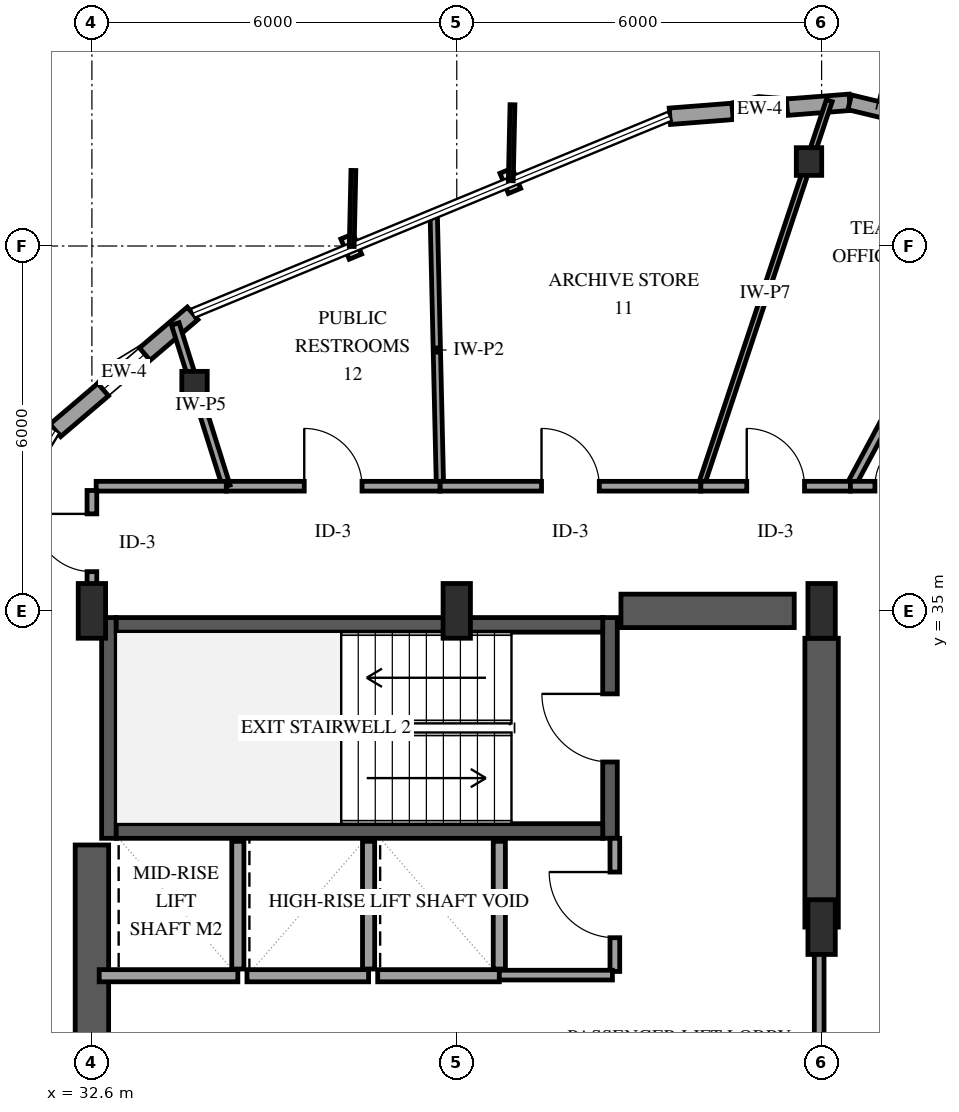
"""IFC4 building model, lengths in metres.
Left out: names, types, materials, properties, quantities, classifications, styles, units other than length and angle.
Written with IfcOpenShell. Run it as: python <this file> out.ifc"""

import sys

from ifc_helpers import new_model, si_unit, direction, frame, frame_2d, origin, origin_2d, place, context, subcontext, project, spatial, rectangle, i_section, extrude, element, fill, save


model = new_model("IFC4")
c1 = context("Model", 3, precision=1e-05, world=origin(), true_north=direction((0.0, 1.0)))
c2 = subcontext(c1, "Body", "Model", "MODEL_VIEW")
j1 = project(units=[si_unit("LENGTHUNIT", "METRE"), si_unit("PLANEANGLEUNIT", "RADIAN")], contexts=[c1])
p1 = place(None, origin())
s1 = spatial("IfcSite", under=j1, at=p1, CompositionType="ELEMENT")
p2 = place(p1, origin())
s2 = spatial("IfcBuilding", under=s1, at=p2, CompositionType="ELEMENT")
p3 = place(p2, frame((0.0, 0.0, 114.7)))
s3 = spatial("IfcBuildingStorey", under=s2, at=p3, CompositionType="ELEMENT", Elevation=114.7)
p4 = place(p3, frame((32.88, 31.26, 0.0), z_axis=(0.0, 0.0, 1.0), x_axis=(0.0, 1.0, 0.0)))
e1 = element("IfcWall", 1, at=p4, inside=s3, PredefinedType="SHEAR", context=c2, shape_type="SweptSolid", body=[
    extrude(rectangle(XDim=3.63, YDim=0.24, at=frame_2d((1.815, 0.0))), origin(), (0.0, 0.0, 1.0), 3.9),
])
p5 = place(p3, frame((41.12, 31.26, 0.0), z_axis=(0.0, 0.0, 1.0), x_axis=(0.0, 1.0, 0.0)))
e2 = element("IfcWall", 2, at=p5, inside=s3, PredefinedType="SHEAR", context=c2, shape_type="SweptSolid", body=[
    extrude(rectangle(XDim=3.63, YDim=0.24, at=frame_2d((1.815, 0.0))), origin(), (0.0, 0.0, 1.0), 3.9),
])
p6 = place(p5, frame((1.255, 0.0, 0.0)))
e3 = element("IfcOpeningElement", 3, at=p6, cuts=e2, PredefinedType="OPENING", context=c2, shape_type="SweptSolid", body=[
    extrude(rectangle(XDim=1.12, YDim=2.15, at=frame_2d((0.56, 1.075))), frame((0.0, 0.13, 0.0), z_axis=(0.0, -1.0, 0.0), x_axis=(1.0, 0.0, 0.0)), (0.0, 0.0, 1.0), 0.26),
])
for number, where, z_axis, x_axis in (
    (4, (33.0, 31.38, 0.0), (0.0, 0.0, 1.0), (1.0, 0.0, 0.0)),
    (5, (33.0, 34.77, 0.0), (0.0, 0.0, 1.0), (1.0, 0.0, 0.0)),
):
    element("IfcWall", number, at=place(p3, frame(where, z_axis=z_axis, x_axis=x_axis)), inside=s3, PredefinedType="SHEAR", context=c2, shape_type="SweptSolid", body=[
        extrude(rectangle(XDim=8.0, YDim=0.24, at=frame_2d((4.0, 0.0))), origin(), (0.0, 0.0, 1.0), 3.9),
    ])
p7 = place(p3, frame((32.6, 18.85, 0.0), z_axis=(0.0, 0.0, 1.0), x_axis=(0.0, 1.0, 0.0)))
e6 = element("IfcWall", 6, at=p7, inside=s3, PredefinedType="SHEAR", context=c2, shape_type="SweptSolid", body=[
    extrude(rectangle(XDim=12.3, YDim=0.55, at=frame_2d((6.15, 0.0))), origin(), (0.0, 0.0, 1.0), 3.9),
])
p8 = place(p3, frame((41.3, 35.0, 0.0), z_axis=(0.0, 0.0, 1.0), x_axis=(1.0, 0.0, 0.0)))
e7 = element("IfcWall", 7, at=p8, inside=s3, PredefinedType="SHEAR", context=c2, shape_type="SweptSolid", body=[
    extrude(rectangle(XDim=2.85, YDim=0.55, at=frame_2d((1.425, 0.0))), origin(), (0.0, 0.0, 1.0), 3.9),
])
p9 = place(p3, frame((44.6, 29.8, 0.0), z_axis=(0.0, 0.0, 1.0), x_axis=(0.0, 1.0, 0.0)))
e8 = element("IfcWall", 8, at=p9, inside=s3, PredefinedType="SHEAR", context=c2, shape_type="SweptSolid", body=[
    extrude(rectangle(XDim=4.75, YDim=0.55, at=frame_2d((2.375, 0.0))), origin(), (0.0, 0.0, 1.0), 3.9),
])
for number, where, z_axis, x_axis in (
    (9, (32.6, 35.0, 0.0), (0.0, 0.0, 1.0), (1.0, 0.0, 0.0)),
    (10, (38.6, 35.0, 0.0), (0.0, 0.0, 1.0), (1.0, 0.0, 0.0)),
    (11, (44.6, 29.8, 0.0), (0.0, 0.0, 1.0), (1.0, 0.0, 0.0)),
    (12, (44.6, 35.0, 0.0), (0.0, 0.0, 1.0), (1.0, 0.0, 0.0)),
):
    element("IfcColumn", number, at=place(p3, frame(where, z_axis=z_axis, x_axis=x_axis)), inside=s3, PredefinedType="PILASTER", context=c2, shape_type="SweptSolid", body=[
        extrude(rectangle(XDim=0.45, YDim=0.9, at=origin_2d()), origin(), (0.0, 0.0, 1.0), 3.9),
    ])
for number, where, z_axis, x_axis in (
    (13, (44.393, 42.389, 0.0), (0.0, 0.0, 1.0), (1.0, 0.0, 0.0)),
    (14, (34.288, 38.711, 0.0), (0.0, 0.0, 1.0), (1.0, 0.0, 0.0)),
):
    element("IfcColumn", number, at=place(p3, frame(where, z_axis=z_axis, x_axis=x_axis)), inside=s3, PredefinedType="COLUMN", context=c2, shape_type="SweptSolid", body=[
        extrude(i_section(OverallWidth=0.418, OverallDepth=0.455, WebThickness=0.042, FlangeThickness=0.068, FilletRadius=0.038, at=origin_2d()), origin(), (0.0, 0.0, 1.0), 3.9),
    ])
p10 = place(p3, frame((45.062, 43.364, 0.0), z_axis=(0.0, 0.0, 1.0), x_axis=(-0.99699708695, -0.077439063873, 0.0)))
e15 = element("IfcWall", 15, at=p10, inside=s3, PredefinedType="SOLIDWALL", context=c2, shape_type="SweptSolid", body=[
    extrude(rectangle(XDim=2.967, YDim=0.27, at=frame_2d((1.483, 0.0))), origin(), (0.0, 0.0, 1.0), 2.979),
])
p11 = place(p10, frame((1.033, 0.0, 0.75)))
e16 = element("IfcOpeningElement", 16, at=p11, cuts=e15, PredefinedType="OPENING", context=c2, shape_type="SweptSolid", body=[
    extrude(rectangle(XDim=0.9, YDim=1.5, at=frame_2d((0.45, 0.75))), frame((0.0, 0.145, 0.0), z_axis=(0.0, -1.0, 0.0), x_axis=(1.0, 0.0, 0.0)), (0.0, 0.0, 1.0), 0.29),
])
p12 = place(p3, frame((53.316, 41.373, 0.0), z_axis=(0.0, 0.0, 1.0), x_axis=(-0.972125162173, 0.234462511014, 0.0)))
e17 = element("IfcWall", 17, at=p12, inside=s3, PredefinedType="SOLIDWALL", context=c2, shape_type="SweptSolid", body=[
    extrude(rectangle(XDim=8.49, YDim=0.25, at=frame_2d((4.245, 0.0))), origin(), (0.0, 0.0, 1.0), 2.979),
])
p13 = place(p12, frame((3.745, 0.0, 0.0)))
e18 = element("IfcOpeningElement", 18, at=p13, cuts=e17, PredefinedType="OPENING", context=c2, shape_type="SweptSolid", body=[
    extrude(rectangle(XDim=1.05, YDim=2.15, at=frame_2d((0.525, 1.075))), frame((0.0, 0.135, 0.0), z_axis=(0.0, -1.0, 0.0), x_axis=(1.0, 0.0, 0.0)), (0.0, 0.0, 1.0), 0.27),
])
p14 = place(p12, frame((0.44, 0.0, 0.72)))
e19 = element("IfcOpeningElement", 19, at=p14, cuts=e17, PredefinedType="OPENING", context=c2, shape_type="SweptSolid", body=[
    extrude(rectangle(XDim=0.9, YDim=1.5, at=frame_2d((0.45, 0.75))), frame((0.0, 0.135, 0.0), z_axis=(0.0, -1.0, 0.0), x_axis=(1.0, 0.0, 0.0)), (0.0, 0.0, 1.0), 0.27),
])
p15 = place(p12, frame((5.907, 0.0, 0.72)))
e20 = element("IfcOpeningElement", 20, at=p15, cuts=e17, PredefinedType="OPENING", context=c2, shape_type="SweptSolid", body=[
    extrude(rectangle(XDim=1.2, YDim=1.6, at=frame_2d((0.6, 0.8))), frame((0.0, 0.135, 0.0), z_axis=(0.0, -1.0, 0.0), x_axis=(1.0, 0.0, 0.0)), (0.0, 0.0, 1.0), 0.27),
])
p16 = place(p3, frame((34.256, 39.893, 0.0), z_axis=(0.0, 0.0, 1.0), x_axis=(-0.761118325799, -0.648613054241, 0.0)))
e21 = element("IfcWall", 21, at=p16, inside=s3, PredefinedType="SOLIDWALL", context=c2, shape_type="SweptSolid", body=[
    extrude(rectangle(XDim=2.967, YDim=0.27, at=frame_2d((1.483, 0.0))), origin(), (0.0, 0.0, 1.0), 2.979),
])
p17 = place(p16, frame((1.033, 0.0, 0.75)))
e22 = element("IfcOpeningElement", 22, at=p17, cuts=e21, PredefinedType="OPENING", context=c2, shape_type="SweptSolid", body=[
    extrude(rectangle(XDim=0.9, YDim=1.5, at=frame_2d((0.45, 0.75))), frame((0.0, 0.145, 0.0), z_axis=(0.0, -1.0, 0.0), x_axis=(1.0, 0.0, 0.0)), (0.0, 0.0, 1.0), 0.29),
])
p18 = place(p3, frame((32.72, 29.0, 0.0), z_axis=(0.0, 0.0, 1.0), x_axis=(1.0, 0.0, 0.0)))
e23 = element("IfcWall", 23, at=p18, inside=s3, PredefinedType="SOLIDWALL", context=c2, shape_type="SweptSolid", body=[
    extrude(rectangle(XDim=2.28, YDim=0.2, at=frame_2d((1.14, 0.0))), origin(), (0.0, 0.0, 1.0), 3.6),
])
p19 = place(p3, frame((35.0, 29.11, 0.0), z_axis=(0.0, 0.0, 1.0), x_axis=(0.0, 1.0, 0.0)))
e24 = element("IfcWall", 24, at=p19, inside=s3, PredefinedType="SOLIDWALL", context=c2, shape_type="SweptSolid", body=[
    extrude(rectangle(XDim=2.1, YDim=0.2, at=frame_2d((1.05, 0.0))), origin(), (0.0, 0.0, 1.0), 3.6),
])
p20 = place(p3, frame((35.15, 29.0, 0.0), z_axis=(0.0, 0.0, 1.0), x_axis=(1.0, 0.0, 0.0)))
e25 = element("IfcWall", 25, at=p20, inside=s3, PredefinedType="SOLIDWALL", context=c2, shape_type="SweptSolid", body=[
    extrude(rectangle(XDim=2.0, YDim=0.2, at=frame_2d((1.0, 0.0))), origin(), (0.0, 0.0, 1.0), 3.6),
])
p21 = place(p3, frame((37.15, 29.11, 0.0), z_axis=(0.0, 0.0, 1.0), x_axis=(0.0, 1.0, 0.0)))
e26 = element("IfcWall", 26, at=p21, inside=s3, PredefinedType="SOLIDWALL", context=c2, shape_type="SweptSolid", body=[
    extrude(rectangle(XDim=2.1, YDim=0.2, at=frame_2d((1.05, 0.0))), origin(), (0.0, 0.0, 1.0), 3.6),
])
p22 = place(p3, frame((37.3, 29.0, 0.0), z_axis=(0.0, 0.0, 1.0), x_axis=(1.0, 0.0, 0.0)))
e27 = element("IfcWall", 27, at=p22, inside=s3, PredefinedType="SOLIDWALL", context=c2, shape_type="SweptSolid", body=[
    extrude(rectangle(XDim=2.0, YDim=0.2, at=frame_2d((1.0, 0.0))), origin(), (0.0, 0.0, 1.0), 3.6),
])
p23 = place(p3, frame((39.3, 29.11, 0.0), z_axis=(0.0, 0.0, 1.0), x_axis=(0.0, 1.0, 0.0)))
e28 = element("IfcWall", 28, at=p23, inside=s3, PredefinedType="SOLIDWALL", context=c2, shape_type="SweptSolid", body=[
    extrude(rectangle(XDim=2.1, YDim=0.2, at=frame_2d((1.05, 0.0))), origin(), (0.0, 0.0, 1.0), 3.6),
])
p24 = place(p3, frame((44.56, 29.8, 0.0), z_axis=(0.0, 0.0, 1.0), x_axis=(0.0, -1.0, 0.0)))
e29 = element("IfcWall", 29, at=p24, inside=s3, PredefinedType="PARTITIONING", context=c2, shape_type="SweptSolid", body=[
    extrude(rectangle(XDim=6.91, YDim=0.16, at=frame_2d((3.455, 0.0))), origin(), (0.0, 0.0, 1.0), 2.64),
])
p25 = place(p24, frame((2.915, 0.0, 0.0)))
e30 = element("IfcOpeningElement", 30, at=p25, cuts=e29, PredefinedType="OPENING", context=c2, shape_type="SweptSolid", body=[
    extrude(rectangle(XDim=1.08, YDim=2.15, at=frame_2d((0.54, 1.075))), frame((0.0, 0.09, 0.0), z_axis=(0.0, -1.0, 0.0), x_axis=(1.0, 0.0, 0.0)), (0.0, 0.0, 1.0), 0.18),
])
p26 = place(p3, frame((42.614, 37.05, 0.0), z_axis=(0.0, 0.0, 1.0), x_axis=(0.316063354252, 0.948738086143, 0.0)))
e31 = element("IfcWall", 31, at=p26, inside=s3, PredefinedType="PARTITIONING", context=c2, shape_type="SweptSolid", body=[
    extrude(rectangle(XDim=6.682, YDim=0.1, at=frame_2d((3.341, 0.0))), origin(), (0.0, 0.0, 1.0), 2.895),
])
p27 = place(p3, frame((45.074, 37.05, 0.0), z_axis=(0.0, 0.0, 1.0), x_axis=(0.473319167136, 0.880891006891, 0.0)))
e32 = element("IfcWall", 32, at=p27, inside=s3, PredefinedType="PARTITIONING", context=c2, shape_type="SweptSolid", body=[
    extrude(rectangle(XDim=6.342, YDim=0.14, at=frame_2d((3.171, 0.0))), origin(), (0.0, 0.0, 1.0), 2.974),
])
p28 = place(p3, frame((38.324, 37.05, 0.0), z_axis=(0.0, 0.0, 1.0), x_axis=(-0.022991196277, 0.999735667511, 0.0)))
e33 = element("IfcWall", 33, at=p28, inside=s3, PredefinedType="PARTITIONING", context=c2, shape_type="SweptSolid", body=[
    extrude(rectangle(XDim=4.481, YDim=0.12, at=frame_2d((2.241, 0.0))), origin(), (0.0, 0.0, 1.0), 3.6),
])
p29 = place(p3, frame((38.324, 37.05, 0.0), z_axis=(0.0, 0.0, 1.0), x_axis=(1.0, 0.0, 0.0)))
e34 = element("IfcWall", 34, at=p29, inside=s3, PredefinedType="PARTITIONING", context=c2, shape_type="SweptSolid", body=[
    extrude(rectangle(XDim=4.29, YDim=0.16, at=frame_2d((2.145, 0.0))), origin(), (0.0, 0.0, 1.0), 3.6),
])
p30 = place(p29, frame((1.67, 0.0, 0.0)))
e35 = element("IfcOpeningElement", 35, at=p30, cuts=e34, PredefinedType="OPENING", context=c2, shape_type="SweptSolid", body=[
    extrude(rectangle(XDim=0.95, YDim=2.15, at=frame_2d((0.475, 1.075))), frame((0.0, 0.09, 0.0), z_axis=(0.0, -1.0, 0.0), x_axis=(1.0, 0.0, 0.0)), (0.0, 0.0, 1.0), 0.18),
])
p31 = place(p3, frame((34.81, 37.05, 0.0), z_axis=(0.0, 0.0, 1.0), x_axis=(1.0, 0.0, 0.0)))
e36 = element("IfcWall", 36, at=p31, inside=s3, PredefinedType="PARTITIONING", context=c2, shape_type="SweptSolid", body=[
    extrude(rectangle(XDim=3.514, YDim=0.16, at=frame_2d((1.757, 0.0))), origin(), (0.0, 0.0, 1.0), 3.6),
])
p32 = place(p31, frame((1.282, 0.0, 0.0)))
e37 = element("IfcOpeningElement", 37, at=p32, cuts=e36, PredefinedType="OPENING", context=c2, shape_type="SweptSolid", body=[
    extrude(rectangle(XDim=0.95, YDim=2.15, at=frame_2d((0.475, 1.075))), frame((0.0, 0.09, 0.0), z_axis=(0.0, -1.0, 0.0), x_axis=(1.0, 0.0, 0.0)), (0.0, 0.0, 1.0), 0.18),
])
p33 = place(p3, frame((34.81, 37.05, 0.0), z_axis=(0.0, 0.0, 1.0), x_axis=(-0.300024068353, 0.953931631936, 0.0)))
e38 = element("IfcWall", 38, at=p33, inside=s3, PredefinedType="PARTITIONING", context=c2, shape_type="SweptSolid", body=[
    extrude(rectangle(XDim=2.797, YDim=0.13, at=frame_2d((1.398, 0.0))), origin(), (0.0, 0.0, 1.0), 2.895),
])
p34 = place(p3, frame((42.614, 37.05, 0.0), z_axis=(0.0, 0.0, 1.0), x_axis=(1.0, 0.0, 0.0)))
e39 = element("IfcWall", 39, at=p34, inside=s3, PredefinedType="PARTITIONING", context=c2, shape_type="SweptSolid", body=[
    extrude(rectangle(XDim=2.46, YDim=0.16, at=frame_2d((1.23, 0.0))), origin(), (0.0, 0.0, 1.0), 3.6),
])
p35 = place(p34, frame((0.755, 0.0, 0.0)))
e40 = element("IfcOpeningElement", 40, at=p35, cuts=e39, PredefinedType="OPENING", context=c2, shape_type="SweptSolid", body=[
    extrude(rectangle(XDim=0.95, YDim=2.15, at=frame_2d((0.475, 1.075))), frame((0.0, 0.09, 0.0), z_axis=(0.0, -1.0, 0.0), x_axis=(1.0, 0.0, 0.0)), (0.0, 0.0, 1.0), 0.18),
])
p36 = place(p3, frame((41.2, 29.07, 0.0), z_axis=(0.0, 0.0, 1.0), x_axis=(0.0, 1.0, 0.0)))
e41 = element("IfcWall", 41, at=p36, inside=s3, PredefinedType="PARTITIONING", context=c2, shape_type="SweptSolid", body=[
    extrude(rectangle(XDim=2.19, YDim=0.16, at=frame_2d((1.095, 0.0))), origin(), (0.0, 0.0, 1.0), 3.6),
])
p37 = place(p36, frame((0.555, 0.0, 0.0)))
e42 = element("IfcOpeningElement", 42, at=p37, cuts=e41, PredefinedType="OPENING", context=c2, shape_type="SweptSolid", body=[
    extrude(rectangle(XDim=1.08, YDim=2.15, at=frame_2d((0.54, 1.075))), frame((0.0, 0.09, 0.0), z_axis=(0.0, -1.0, 0.0), x_axis=(1.0, 0.0, 0.0)), (0.0, 0.0, 1.0), 0.18),
])
p38 = place(p3, frame((32.67, 37.05, 0.0), z_axis=(0.0, 0.0, 1.0), x_axis=(1.0, 0.0, 0.0)))
e43 = element("IfcWall", 43, at=p38, inside=s3, PredefinedType="PARTITIONING", context=c2, shape_type="SweptSolid", body=[
    extrude(rectangle(XDim=2.14, YDim=0.16, at=frame_2d((1.07, 0.0))), origin(), (0.0, 0.0, 1.0), 3.6),
])
p39 = place(p3, frame((32.6, 35.07, 0.0), z_axis=(0.0, 0.0, 1.0), x_axis=(0.0, 1.0, 0.0)))
e44 = element("IfcWall", 44, at=p39, inside=s3, PredefinedType="PARTITIONING", context=c2, shape_type="SweptSolid", body=[
    extrude(rectangle(XDim=1.91, YDim=0.16, at=frame_2d((0.955, 0.0))), origin(), (0.0, 0.0, 1.0), 3.6),
])
p40 = place(p39, frame((0.575, 0.0, 0.0)))
e45 = element("IfcOpeningElement", 45, at=p40, cuts=e44, PredefinedType="OPENING", context=c2, shape_type="SweptSolid", body=[
    extrude(rectangle(XDim=0.95, YDim=2.15, at=frame_2d((0.475, 1.075))), frame((0.0, 0.09, 0.0), z_axis=(0.0, -1.0, 0.0), x_axis=(1.0, 0.0, 0.0)), (0.0, 0.0, 1.0), 0.18),
])
p41 = place(p3, frame((39.3, 29.01, 0.0), z_axis=(0.0, 0.0, 1.0), x_axis=(1.0, 0.0, 0.0)))
e46 = element("IfcWall", 46, at=p41, inside=s3, PredefinedType="PARTITIONING", context=c2, shape_type="SweptSolid", body=[
    extrude(rectangle(XDim=1.86, YDim=0.16, at=frame_2d((0.93, 0.0))), origin(), (0.0, 0.0, 1.0), 3.6),
])
p42 = place(p3, frame((45.074, 37.05, 0.0), z_axis=(0.0, 0.0, 1.0), x_axis=(1.0, 0.0, 0.0)))
e47 = element("IfcWall", 47, at=p42, inside=s3, PredefinedType="PARTITIONING", context=c2, shape_type="SweptSolid", body=[
    extrude(rectangle(XDim=1.506, YDim=0.16, at=frame_2d((0.753, 0.0))), origin(), (0.0, 0.0, 1.0), 3.6),
])
p43 = place(p42, frame((0.403, 0.0, 0.0)))
e48 = element("IfcOpeningElement", 48, at=p43, cuts=e47, PredefinedType="OPENING", context=c2, shape_type="SweptSolid", body=[
    extrude(rectangle(XDim=0.85, YDim=2.1, at=frame_2d((0.425, 1.05))), frame((0.0, 0.09, 0.0), z_axis=(0.0, -1.0, 0.0), x_axis=(1.0, 0.0, 0.0)), (0.0, 0.0, 1.0), 0.18),
])
p44 = place(p11, origin())
e49 = element("IfcWindow", 49, at=p44, inside=s3, PartitioningType="SINGLE_PANEL", PredefinedType="WINDOW", context=c2, shape_type="SweptSolid", body=[
    extrude(rectangle(XDim=0.9, YDim=1.5, at=frame_2d((0.45, 0.75))), frame((0.0, 0.03, 0.0), z_axis=(0.0, -1.0, 0.0), x_axis=(1.0, 0.0, 0.0)), (0.0, 0.0, 1.0), 0.06),
])
fill(e16, e49)
p45 = place(p17, origin())
e50 = element("IfcWindow", 50, at=p45, inside=s3, PartitioningType="SINGLE_PANEL", PredefinedType="WINDOW", context=c2, shape_type="SweptSolid", body=[
    extrude(rectangle(XDim=0.9, YDim=1.5, at=frame_2d((0.45, 0.75))), frame((0.0, 0.03, 0.0), z_axis=(0.0, -1.0, 0.0), x_axis=(1.0, 0.0, 0.0)), (0.0, 0.0, 1.0), 0.06),
])
fill(e22, e50)
p46 = place(p6, origin())
e51 = element("IfcDoor", 51, at=p46, inside=s3, OperationType="SINGLE_SWING_RIGHT", PredefinedType="DOOR", context=c2, shape_type="SweptSolid", body=[
    extrude(rectangle(XDim=1.12, YDim=2.15, at=frame_2d((0.56, 1.075))), frame((0.0, 0.025, 0.0), z_axis=(0.0, -1.0, 0.0), x_axis=(1.0, 0.0, 0.0)), (0.0, 0.0, 1.0), 0.05),
])
fill(e3, e51)
p47 = place(p30, origin())
e52 = element("IfcDoor", 52, at=p47, inside=s3, OperationType="SINGLE_SWING_LEFT", PredefinedType="DOOR", context=c2, shape_type="SweptSolid", body=[
    extrude(rectangle(XDim=0.95, YDim=2.15, at=frame_2d((0.475, 1.075))), frame((0.0, 0.025, 0.0), z_axis=(0.0, -1.0, 0.0), x_axis=(1.0, 0.0, 0.0)), (0.0, 0.0, 1.0), 0.05),
])
fill(e35, e52)
p48 = place(p32, origin())
e53 = element("IfcDoor", 53, at=p48, inside=s3, OperationType="SINGLE_SWING_LEFT", PredefinedType="DOOR", context=c2, shape_type="SweptSolid", body=[
    extrude(rectangle(XDim=0.95, YDim=2.15, at=frame_2d((0.475, 1.075))), frame((0.0, 0.025, 0.0), z_axis=(0.0, -1.0, 0.0), x_axis=(1.0, 0.0, 0.0)), (0.0, 0.0, 1.0), 0.05),
])
fill(e37, e53)
p49 = place(p35, origin())
e54 = element("IfcDoor", 54, at=p49, inside=s3, OperationType="SINGLE_SWING_LEFT", PredefinedType="DOOR", context=c2, shape_type="SweptSolid", body=[
    extrude(rectangle(XDim=0.95, YDim=2.15, at=frame_2d((0.475, 1.075))), frame((0.0, 0.025, 0.0), z_axis=(0.0, -1.0, 0.0), x_axis=(1.0, 0.0, 0.0)), (0.0, 0.0, 1.0), 0.05),
])
fill(e40, e54)
p50 = place(p37, origin())
e55 = element("IfcDoor", 55, at=p50, inside=s3, OperationType="SINGLE_SWING_RIGHT", PredefinedType="DOOR", context=c2, shape_type="SweptSolid", body=[
    extrude(rectangle(XDim=1.08, YDim=2.15, at=frame_2d((0.54, 1.075))), frame((0.0, 0.025, 0.0), z_axis=(0.0, -1.0, 0.0), x_axis=(1.0, 0.0, 0.0)), (0.0, 0.0, 1.0), 0.05),
])
fill(e42, e55)
p51 = place(p40, origin())
e56 = element("IfcDoor", 56, at=p51, inside=s3, OperationType="SINGLE_SWING_RIGHT", PredefinedType="DOOR", context=c2, shape_type="SweptSolid", body=[
    extrude(rectangle(XDim=0.95, YDim=2.15, at=frame_2d((0.475, 1.075))), frame((0.0, 0.025, 0.0), z_axis=(0.0, -1.0, 0.0), x_axis=(1.0, 0.0, 0.0)), (0.0, 0.0, 1.0), 0.05),
])
fill(e45, e56)
p52 = place(p43, origin())
e57 = element("IfcDoor", 57, at=p52, inside=s3, OperationType="SINGLE_SWING_RIGHT", PredefinedType="DOOR", context=c2, shape_type="SweptSolid", body=[
    extrude(rectangle(XDim=0.85, YDim=2.1, at=frame_2d((0.425, 1.05))), frame((0.0, 0.025, 0.0), z_axis=(0.0, -1.0, 0.0), x_axis=(1.0, 0.0, 0.0)), (0.0, 0.0, 1.0), 0.05),
])
fill(e48, e57)
save(model, sys.argv[1])
